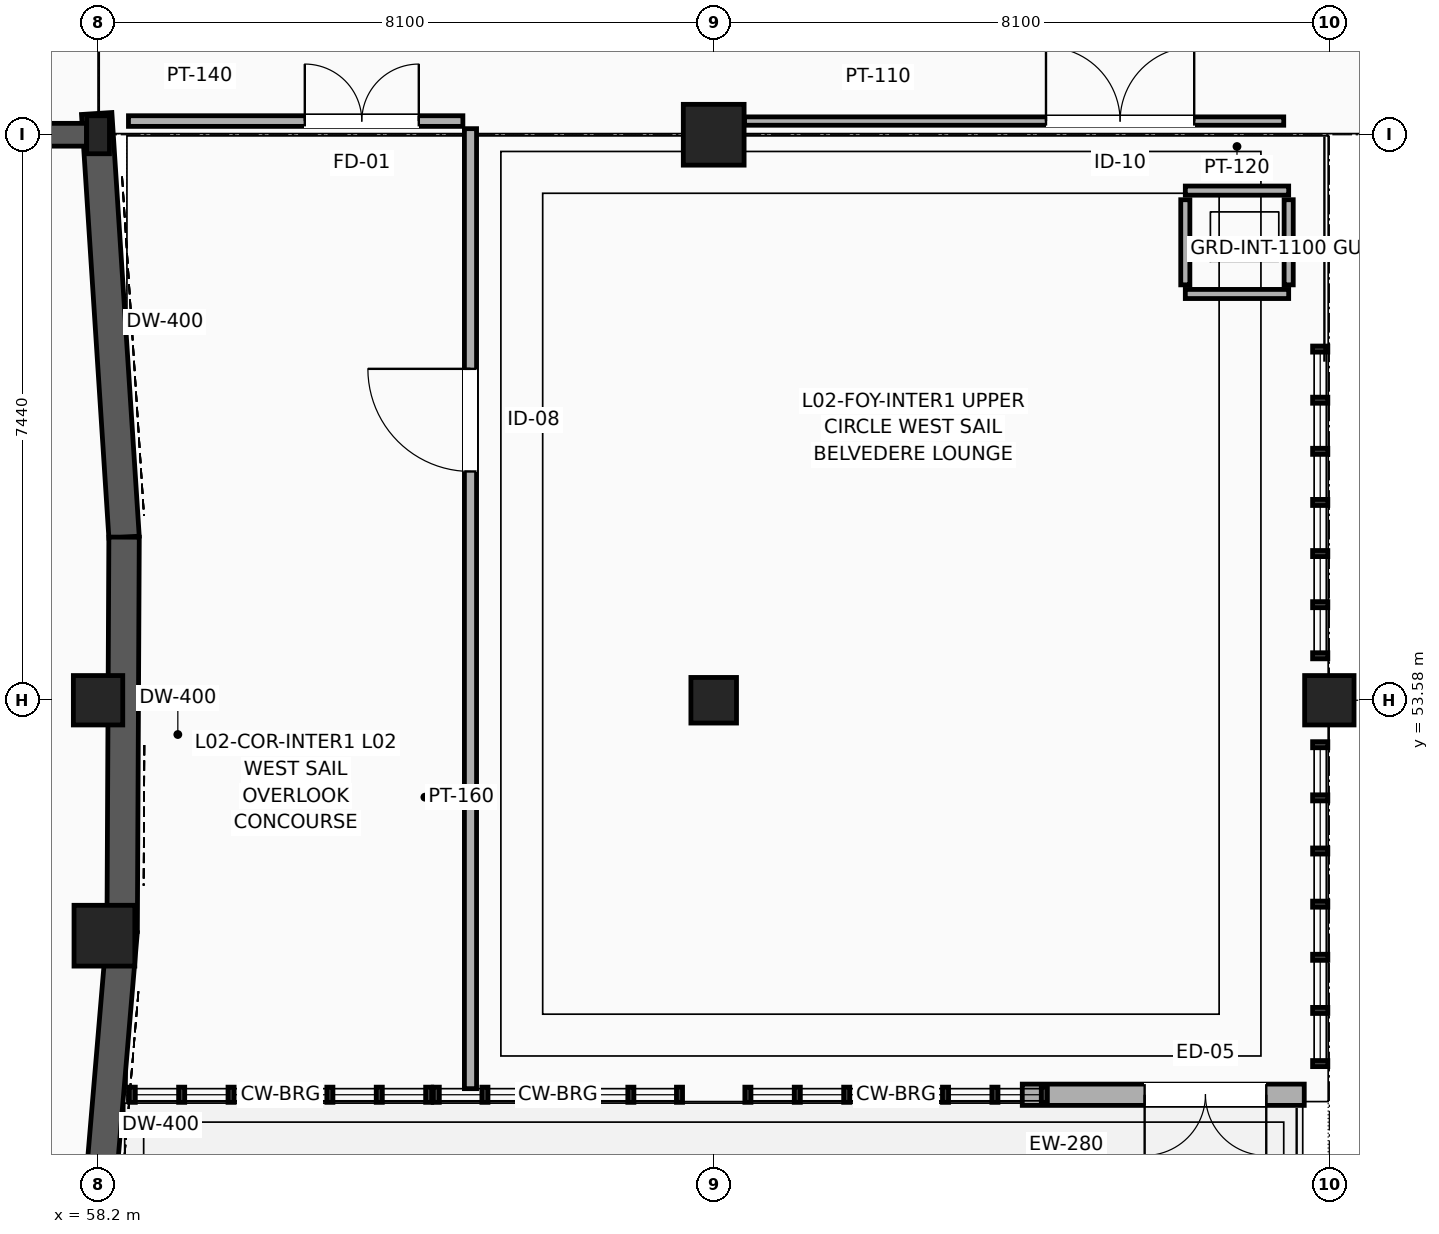
"""IFC4 building model, lengths in metres.
Left out: names, types, materials, properties, quantities, classifications, styles, units other than length and angle.
Written with IfcOpenShell. Run it as: python <this file> out.ifc"""

import sys

from ifc_helpers import new_model, si_unit, direction, frame, frame_2d, origin, origin_2d, place, context, subcontext, project, spatial, rectangle, circle, i_section, extrude, element, fill, save


model = new_model("IFC4")
c1 = context("Model", 3, precision=1e-05, world=origin(), true_north=direction((0.0, 1.0)))
c2 = subcontext(c1, "Body", "Model", "MODEL_VIEW")
j1 = project(units=[si_unit("LENGTHUNIT", "METRE"), si_unit("PLANEANGLEUNIT", "RADIAN")], contexts=[c1])
p1 = place(None, origin())
s1 = spatial("IfcSite", under=j1, at=p1, CompositionType="ELEMENT")
p2 = place(p1, origin())
s2 = spatial("IfcBuilding", under=s1, at=p2, CompositionType="ELEMENT")
p3 = place(p2, frame((0.0, 0.0, 10.2)))
s3 = spatial("IfcBuildingStorey", under=s2, at=p3, CompositionType="ELEMENT", Elevation=10.2)
p4 = place(p3, frame((58.2, 53.58, 0.0), z_axis=(0.0, 0.0, 1.0), x_axis=(1.0, 0.0, 0.0)))
e1 = element("IfcColumn", 1, at=p4, inside=s3, PredefinedType="COLUMN", context=c2, shape_type="SweptSolid", body=[
    extrude(circle(Radius=0.325, at=origin_2d()), origin(), (0.0, 0.0, 1.0), 4.5),
])
p5 = place(p3, frame((58.2, 61.02, 0.0), z_axis=(0.0, 0.0, 1.0), x_axis=(1.0, 0.0, 0.0)))
e2 = element("IfcColumn", 2, at=p5, inside=s3, PredefinedType="COLUMN", context=c2, shape_type="SweptSolid", body=[
    extrude(i_section(OverallWidth=0.3, OverallDepth=0.5, WebThickness=0.014, FlangeThickness=0.028, FilletRadius=0.027, at=origin_2d()), origin(), (0.0, 0.0, 1.0), 4.5),
])
p6 = place(p3, frame((66.3, 53.58, 0.0), z_axis=(0.0, 0.0, 1.0), x_axis=(1.0, 0.0, 0.0)))
e3 = element("IfcColumn", 3, at=p6, inside=s3, PredefinedType="COLUMN", context=c2, shape_type="SweptSolid", body=[
    extrude(rectangle(XDim=0.6, YDim=0.6, at=origin_2d()), origin(), (0.0, 0.0, 1.0), 4.5),
])
p7 = place(p3, frame((66.3, 61.02, 0.0), z_axis=(0.0, 0.0, 1.0), x_axis=(1.0, 0.0, 0.0)))
e4 = element("IfcColumn", 4, at=p7, inside=s3, PredefinedType="COLUMN", context=c2, shape_type="SweptSolid", body=[
    extrude(rectangle(XDim=0.8, YDim=0.8, at=origin_2d()), origin(), (0.0, 0.0, 1.0), 4.5),
])
p8 = place(p3, frame((74.4, 53.58, 0.0), z_axis=(0.0, 0.0, 1.0), x_axis=(1.0, 0.0, 0.0)))
e5 = element("IfcColumn", 5, at=p8, inside=s3, PredefinedType="COLUMN", context=c2, shape_type="SweptSolid", body=[
    extrude(circle(Radius=0.325, at=origin_2d()), origin(), (0.0, 0.0, 1.0), 4.5),
])
p9 = place(p3, frame((58.284, 50.482, 0.0), z_axis=(0.0, 0.0, 1.0), x_axis=(1.0, 0.0, 0.0)))
e6 = element("IfcColumn", 6, at=p9, inside=s3, PredefinedType="COLUMN", context=c2, shape_type="SweptSolid", body=[
    extrude(rectangle(XDim=0.8, YDim=0.8, at=origin_2d()), origin(), (0.0, 0.0, 1.0), 4.5),
])
p10 = place(p3, frame((58.182, 61.299, 0.0), z_axis=(0.0, 0.0, 1.0), x_axis=(0.064519893008, -0.997916421053, 0.0)))
e7 = element("IfcWall", 7, at=p10, inside=s3, PredefinedType="SHEAR", context=c2, shape_type="SweptSolid", body=[
    extrude(rectangle(XDim=5.585, YDim=0.4, at=frame_2d((2.792, 0.0))), origin(), (0.0, 0.0, 1.0), 4.225),
])
p11 = place(p3, frame((58.542, 55.726, 0.0), z_axis=(0.0, 0.0, 1.0), x_axis=(-0.004895671688, -0.999988016128, 0.0)))
e8 = element("IfcWall", 8, at=p11, inside=s3, PredefinedType="SHEAR", context=c2, shape_type="SweptSolid", body=[
    extrude(rectangle(XDim=5.186, YDim=0.4, at=frame_2d((2.593, 0.0))), origin(), (0.0, 0.0, 1.0), 4.225),
])
p12 = place(p3, frame((58.517, 50.54, 0.0), z_axis=(0.0, 0.0, 1.0), x_axis=(-0.084239735825, -0.996445516277, 0.0)))
e9 = element("IfcWall", 9, at=p12, inside=s3, PredefinedType="SHEAR", context=c2, shape_type="SweptSolid", body=[
    extrude(rectangle(XDim=4.991, YDim=0.4, at=frame_2d((2.495, 0.0))), origin(), (0.0, 0.0, 1.0), 4.225),
])
p13 = place(p3, frame((74.07, 48.39, 0.0), z_axis=(0.0, 0.0, 1.0), x_axis=(-1.0, 0.0, 0.0)))
e10 = element("IfcWall", 10, at=p13, inside=s3, PredefinedType="SOLIDWALL", context=c2, shape_type="SweptSolid", body=[
    extrude(rectangle(XDim=3.71, YDim=0.28, at=frame_2d((1.855, 0.0))), origin(), (0.0, 0.0, 1.0), 4.205),
])
p14 = place(p13, frame((0.5, 0.0, 0.0)))
e11 = element("IfcOpeningElement", 11, at=p14, cuts=e10, PredefinedType="OPENING", context=c2, shape_type="SweptSolid", body=[
    extrude(rectangle(XDim=1.6, YDim=2.3, at=frame_2d((0.8, 1.15))), frame((0.0, 0.15, 0.0), z_axis=(0.0, -1.0, 0.0), x_axis=(1.0, 0.0, 0.0)), (0.0, 0.0, 1.0), 0.3),
])
p15 = place(p3, frame((50.252, 61.02, 0.0), z_axis=(0.0, 0.0, 1.0), x_axis=(1.0, 0.0, 0.0)))
e12 = element("IfcWall", 12, at=p15, inside=s3, PredefinedType="SHEAR", context=c2, shape_type="SweptSolid", body=[
    extrude(rectangle(XDim=7.796, YDim=0.3, at=frame_2d((3.898, 0.0))), origin(), (0.0, 0.0, 1.0), 4.225),
])
p16 = place(p15, frame((4.35, 0.0, 0.0)))
e13 = element("IfcOpeningElement", 13, at=p16, cuts=e12, PredefinedType="OPENING", context=c2, shape_type="SweptSolid", body=[
    extrude(rectangle(XDim=1.8, YDim=2.4, at=frame_2d((0.9, 1.2))), frame((0.0, 0.16, 0.0), z_axis=(0.0, -1.0, 0.0), x_axis=(1.0, 0.0, 0.0)), (0.0, 0.0, 1.0), 0.32),
])
for number, where, z_axis, x_axis in (
    (14, (72.505, 58.925, 0.0), (0.0, 0.0, 1.0), (1.0, 0.0, 0.0)),
    (15, (72.505, 60.285, 0.0), (0.0, 0.0, 1.0), (1.0, 0.0, 0.0)),
):
    element("IfcWall", number, at=place(p3, frame(where, z_axis=z_axis, x_axis=x_axis)), inside=s3, PredefinedType="PARTITIONING", context=c2, shape_type="SweptSolid", body=[
        extrude(rectangle(XDim=1.36, YDim=0.12, at=frame_2d((0.68, 0.0))), origin(), (0.0, 0.0, 1.0), 4.205),
    ])
for number, where, z_axis, x_axis in (
    (16, (72.505, 59.045, 0.0), (0.0, 0.0, 1.0), (0.0, 1.0, 0.0)),
    (17, (73.865, 59.045, 0.0), (0.0, 0.0, 1.0), (0.0, 1.0, 0.0)),
):
    element("IfcWall", number, at=place(p3, frame(where, z_axis=z_axis, x_axis=x_axis)), inside=s3, PredefinedType="PARTITIONING", context=c2, shape_type="SweptSolid", body=[
        extrude(rectangle(XDim=1.12, YDim=0.12, at=frame_2d((0.56, 0.0))), origin(), (0.0, 0.0, 1.0), 4.205),
    ])
p17 = place(p3, frame((63.1, 48.47, 0.0), z_axis=(0.0, 0.0, 1.0), x_axis=(0.0, 1.0, 0.0)))
e18 = element("IfcWall", 18, at=p17, inside=s3, PredefinedType="PARTITIONING", context=c2, shape_type="SweptSolid", body=[
    extrude(rectangle(XDim=12.63, YDim=0.16, at=frame_2d((6.315, 0.0))), origin(), (0.0, 0.0, 1.0), 3.707),
])
p18 = place(p17, frame((8.12, 0.0, 0.0)))
e19 = element("IfcOpeningElement", 19, at=p18, cuts=e18, PredefinedType="OPENING", context=c2, shape_type="SweptSolid", body=[
    extrude(rectangle(XDim=1.35, YDim=2.2, at=frame_2d((0.675, 1.1))), frame((0.0, 0.09, 0.0), z_axis=(0.0, -1.0, 0.0), x_axis=(1.0, 0.0, 0.0)), (0.0, 0.0, 1.0), 0.18),
])
p19 = place(p3, frame((58.6, 61.2, 0.0), z_axis=(0.0, 0.0, 1.0), x_axis=(1.0, 0.0, 0.0)))
e20 = element("IfcWall", 20, at=p19, inside=s3, PredefinedType="PARTITIONING", context=c2, shape_type="SweptSolid", body=[
    extrude(rectangle(XDim=4.4, YDim=0.14, at=frame_2d((2.2, 0.0))), origin(), (0.0, 0.0, 1.0), 3.877),
])
p20 = place(p19, frame((2.32, 0.0, 0.0)))
e21 = element("IfcOpeningElement", 21, at=p20, cuts=e20, PredefinedType="OPENING", context=c2, shape_type="SweptSolid", body=[
    extrude(rectangle(XDim=1.5, YDim=2.2, at=frame_2d((0.75, 1.1))), frame((0.0, 0.08, 0.0), z_axis=(0.0, -1.0, 0.0), x_axis=(1.0, 0.0, 0.0)), (0.0, 0.0, 1.0), 0.16),
])
p21 = place(p3, frame((66.705, 61.2, 0.0), z_axis=(0.0, 0.0, 1.0), x_axis=(1.0, 0.0, 0.0)))
e22 = element("IfcWall", 22, at=p21, inside=s3, PredefinedType="PARTITIONING", context=c2, shape_type="SweptSolid", body=[
    extrude(rectangle(XDim=7.095, YDim=0.11, at=frame_2d((3.547, 0.0))), origin(), (0.0, 0.0, 1.0), 3.007),
])
p22 = place(p21, frame((3.967, 0.0, 0.0)))
e23 = element("IfcOpeningElement", 23, at=p22, cuts=e22, PredefinedType="OPENING", context=c2, shape_type="SweptSolid", body=[
    extrude(rectangle(XDim=1.95, YDim=2.45, at=frame_2d((0.975, 1.225))), frame((0.0, 0.065, 0.0), z_axis=(0.0, -1.0, 0.0), x_axis=(1.0, 0.0, 0.0)), (0.0, 0.0, 1.0), 0.13),
])
p23 = place(p14, origin())
e24 = element("IfcDoor", 24, at=p23, inside=s3, OperationType="DOUBLE_DOOR_SINGLE_SWING", PredefinedType="DOOR", context=c2, shape_type="SweptSolid", body=[
    extrude(rectangle(XDim=1.6, YDim=2.3, at=frame_2d((0.8, 1.15))), frame((0.0, 0.025, 0.0), z_axis=(0.0, -1.0, 0.0), x_axis=(1.0, 0.0, 0.0)), (0.0, 0.0, 1.0), 0.05),
])
fill(e11, e24)
p24 = place(p18, origin())
e25 = element("IfcDoor", 25, at=p24, inside=s3, OperationType="SINGLE_SWING_RIGHT", PredefinedType="DOOR", context=c2, shape_type="SweptSolid", body=[
    extrude(rectangle(XDim=1.35, YDim=2.2, at=frame_2d((0.675, 1.1))), frame((0.0, 0.025, 0.0), z_axis=(0.0, -1.0, 0.0), x_axis=(1.0, 0.0, 0.0)), (0.0, 0.0, 1.0), 0.05),
])
fill(e19, e25)
p25 = place(p20, origin())
e26 = element("IfcDoor", 26, at=p25, inside=s3, OperationType="DOUBLE_DOOR_SINGLE_SWING", PredefinedType="DOOR", context=c2, shape_type="SweptSolid", body=[
    extrude(rectangle(XDim=1.5, YDim=2.2, at=frame_2d((0.75, 1.1))), frame((0.0, 0.025, 0.0), z_axis=(0.0, -1.0, 0.0), x_axis=(1.0, 0.0, 0.0)), (0.0, 0.0, 1.0), 0.05),
])
fill(e21, e26)
p26 = place(p22, origin())
e27 = element("IfcDoor", 27, at=p26, inside=s3, OperationType="DOUBLE_DOOR_SINGLE_SWING", PredefinedType="DOOR", context=c2, shape_type="SweptSolid", body=[
    extrude(rectangle(XDim=1.95, YDim=2.45, at=frame_2d((0.975, 1.225))), frame((0.0, 0.025, 0.0), z_axis=(0.0, -1.0, 0.0), x_axis=(1.0, 0.0, 0.0)), (0.0, 0.0, 1.0), 0.05),
])
fill(e23, e27)
save(model, sys.argv[1])
